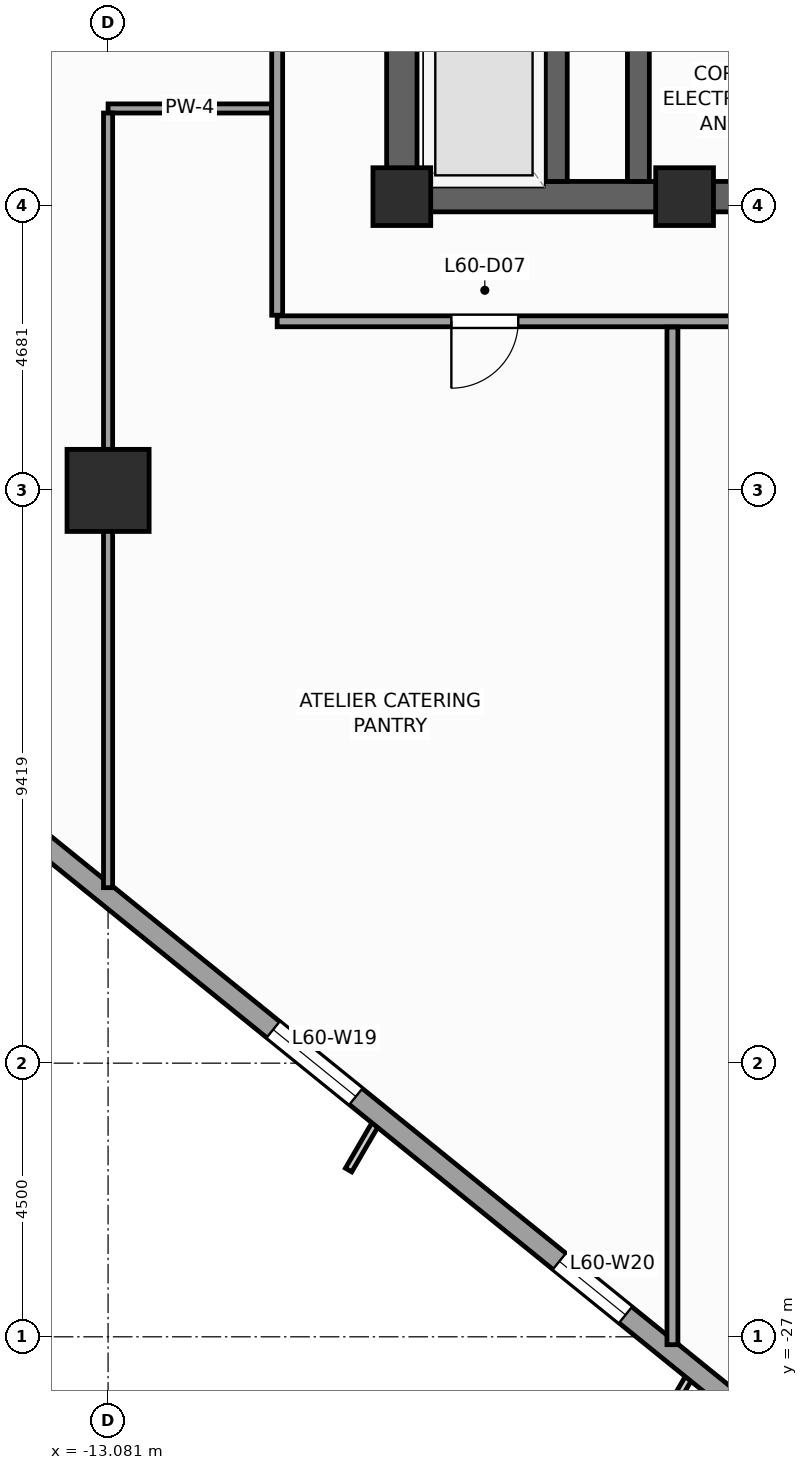
"""IFC4 building model, lengths in metres.
Left out: names, types, materials, properties, quantities, classifications, styles, units other than length and angle.
Written with IfcOpenShell. Run it as: python <this file> out.ifc"""

import sys

from ifc_helpers import new_model, si_unit, direction, frame, frame_2d, origin, origin_2d, place, context, subcontext, project, spatial, rectangle, extrude, source, transform, mapped, element, fill, save


model = new_model("IFC4")
c1 = context("Model", 3, precision=1e-05, world=origin(), true_north=direction((0.0, 1.0)))
c2 = subcontext(c1, "Body", "Model", "MODEL_VIEW")
j1 = project(units=[si_unit("LENGTHUNIT", "METRE"), si_unit("PLANEANGLEUNIT", "RADIAN")], contexts=[c1])
p1 = place(None, origin())
s1 = spatial("IfcSite", under=j1, at=p1, CompositionType="ELEMENT")
p2 = place(p1, origin())
s2 = spatial("IfcBuilding", under=s1, at=p2, CompositionType="ELEMENT")
p3 = place(p2, frame((0.0, 0.0, 248.5)))
s3 = spatial("IfcBuildingStorey", under=s2, at=p3, CompositionType="ELEMENT", Elevation=248.5)
p4 = place(p3, frame((-8.5, -8.25, 0.0), z_axis=(0.0, 0.0, 1.0), x_axis=(1.0, 0.0, 0.0)))
e1 = element("IfcWall", 1, at=p4, inside=s3, PredefinedType="SHEAR", context=c2, shape_type="SweptSolid", body=[
    extrude(rectangle(XDim=17.0, YDim=0.5, at=frame_2d((8.5, 0.0))), origin(), (0.0, 0.0, 1.0), 3.9),
])
p5 = place(p4, frame((7.85, 0.0, 0.0)))
e2 = element("IfcOpeningElement", 2, at=p5, cuts=e1, PredefinedType="OPENING", context=c2, shape_type="SweptSolid", body=[
    extrude(rectangle(XDim=1.3, YDim=2.2, at=frame_2d((0.65, 1.1))), frame((0.0, 0.26, 0.0), z_axis=(0.0, -1.0, 0.0), x_axis=(1.0, 0.0, 0.0)), (0.0, 0.0, 1.0), 0.52),
])
p6 = place(p3, frame((-8.25, -8.0, 0.0), z_axis=(0.0, 0.0, 1.0), x_axis=(0.0, 1.0, 0.0)))
e3 = element("IfcWall", 3, at=p6, inside=s3, PredefinedType="SHEAR", context=c2, shape_type="SweptSolid", body=[
    extrude(rectangle(XDim=16.0, YDim=0.5, at=frame_2d((8.0, 0.0))), origin(), (0.0, 0.0, 1.0), 3.9),
])
p7 = place(p6, frame((4.69, 0.0, 0.0)))
e4 = element("IfcOpeningElement", 4, at=p7, cuts=e3, PredefinedType="OPENING", context=c2, shape_type="SweptSolid", body=[
    extrude(rectangle(XDim=1.3, YDim=2.2, at=frame_2d((0.65, 1.1))), frame((0.0, 0.26, 0.0), z_axis=(0.0, -1.0, 0.0), x_axis=(1.0, 0.0, 0.0)), (0.0, 0.0, 1.0), 0.52),
])
p8 = place(p3, frame((-4.36, -8.0, 0.0), z_axis=(0.0, 0.0, 1.0), x_axis=(0.0, 1.0, 0.0)))
e5 = element("IfcWall", 5, at=p8, inside=s3, PredefinedType="SHEAR", context=c2, shape_type="SweptSolid", body=[
    extrude(rectangle(XDim=16.0, YDim=0.36, at=frame_2d((8.0, 0.0))), origin(), (0.0, 0.0, 1.0), 3.9),
])
p9 = place(p3, frame((-5.71, -8.0, 0.0), z_axis=(0.0, 0.0, 1.0), x_axis=(0.0, 1.0, 0.0)))
e6 = element("IfcWall", 6, at=p9, inside=s3, PredefinedType="SHEAR", context=c2, shape_type="SweptSolid", body=[
    extrude(rectangle(XDim=2.54, YDim=0.36, at=frame_2d((1.27, 0.0))), origin(), (0.0, 0.0, 1.0), 3.9),
])
m1 = source(origin(), c2, "Body", "SweptSolid", [
    extrude(rectangle(XDim=0.95, YDim=0.95, at=origin_2d()), origin(), (0.0, 0.0, 1.0), 3.9),
])
for number, where, z_axis, x_axis in (
    (7, (-8.25, -8.25, 0.0), (0.0, 0.0, 1.0), (1.0, 0.0, 0.0)),
    (8, (-3.6, -8.25, 0.0), (0.0, 0.0, 1.0), (1.0, 0.0, 0.0)),
):
    element("IfcColumn", number, at=place(p3, frame(where, z_axis=z_axis, x_axis=x_axis)), inside=s3, PredefinedType="PILASTER", context=c2, shape_type="MappedRepresentation", body=[
        mapped(m1, transform((0.0, 0.0, 0.0), scale=1.0)),
    ])
m2 = source(origin(), c2, "Body", "SweptSolid", [
    extrude(rectangle(XDim=1.35, YDim=1.35, at=origin_2d()), origin(), (0.0, 0.0, 1.0), 3.9),
])
p10 = place(p3, frame((-13.081, -13.081, 0.0), z_axis=(0.0, 0.0, 1.0), x_axis=(1.0, 0.0, 0.0)))
e9 = element("IfcColumn", 9, at=p10, inside=s3, PredefinedType="COLUMN", context=c2, shape_type="MappedRepresentation", body=[
    mapped(m2, transform((0.0, 0.0, 0.0), scale=1.0)),
])
p11 = place(p3, frame((-29.154, -6.733, 0.0), z_axis=(0.0, 0.0, 1.0), x_axis=(0.77714192302, -0.629325378072, 0.0)))
e10 = element("IfcWall", 10, at=p11, inside=s3, PredefinedType="STANDARD", context=c2, shape_type="SweptSolid", body=[
    extrude(rectangle(XDim=36.84, YDim=0.34, at=frame_2d((18.42, 0.0))), origin(), (0.0, 0.0, 1.0), 2.96),
])
p12 = place(p11, frame((3.721, 0.0, 0.48)))
e11 = element("IfcOpeningElement", 11, at=p12, cuts=e10, PredefinedType="OPENING", context=c2, shape_type="SweptSolid", body=[
    extrude(rectangle(XDim=1.4, YDim=2.4, at=frame_2d((0.7, 1.2))), frame((0.0, 0.18, 0.0), z_axis=(0.0, -1.0, 0.0), x_axis=(1.0, 0.0, 0.0)), (0.0, 0.0, 1.0), 0.36),
])
p13 = place(p11, frame((9.809, 0.0, 0.58)))
e12 = element("IfcOpeningElement", 12, at=p13, cuts=e10, PredefinedType="OPENING", context=c2, shape_type="SweptSolid", body=[
    extrude(rectangle(XDim=1.75, YDim=2.3, at=frame_2d((0.875, 1.15))), frame((0.0, 0.18, 0.0), z_axis=(0.0, -1.0, 0.0), x_axis=(1.0, 0.0, 0.0)), (0.0, 0.0, 1.0), 0.36),
])
p14 = place(p11, frame((16.058, 0.0, 0.58)))
e13 = element("IfcOpeningElement", 13, at=p14, cuts=e10, PredefinedType="OPENING", context=c2, shape_type="SweptSolid", body=[
    extrude(rectangle(XDim=1.75, YDim=2.3, at=frame_2d((0.875, 1.15))), frame((0.0, 0.18, 0.0), z_axis=(0.0, -1.0, 0.0), x_axis=(1.0, 0.0, 0.0)), (0.0, 0.0, 1.0), 0.36),
])
p15 = place(p11, frame((24.176, 0.0, 0.58)))
e14 = element("IfcOpeningElement", 14, at=p15, cuts=e10, PredefinedType="OPENING", context=c2, shape_type="SweptSolid", body=[
    extrude(rectangle(XDim=1.75, YDim=2.3, at=frame_2d((0.875, 1.15))), frame((0.0, 0.18, 0.0), z_axis=(0.0, -1.0, 0.0), x_axis=(1.0, 0.0, 0.0)), (0.0, 0.0, 1.0), 0.36),
])
p16 = place(p11, frame((30.232, 0.0, 0.48)))
e15 = element("IfcOpeningElement", 15, at=p16, cuts=e10, PredefinedType="OPENING", context=c2, shape_type="SweptSolid", body=[
    extrude(rectangle(XDim=1.4, YDim=2.4, at=frame_2d((0.7, 1.2))), frame((0.0, 0.18, 0.0), z_axis=(0.0, -1.0, 0.0), x_axis=(1.0, 0.0, 0.0)), (0.0, 0.0, 1.0), 0.36),
])
p17 = place(p3, frame((-10.3, -10.3, 0.0), z_axis=(0.0, 0.0, 1.0), x_axis=(1.0, 0.0, 0.0)))
e16 = element("IfcWall", 16, at=p17, inside=s3, PredefinedType="PARTITIONING", context=c2, shape_type="SweptSolid", body=[
    extrude(rectangle(XDim=22.75, YDim=0.18, at=frame_2d((11.375, 0.0))), origin(), (0.0, 0.0, 1.0), 3.66),
])
p18 = place(p17, frame((9.75, 0.0, 0.0)))
e17 = element("IfcOpeningElement", 17, at=p18, cuts=e16, PredefinedType="OPENING", context=c2, shape_type="SweptSolid", body=[
    extrude(rectangle(XDim=1.1, YDim=2.2, at=frame_2d((0.55, 1.1))), frame((0.0, 0.1, 0.0), z_axis=(0.0, -1.0, 0.0), x_axis=(1.0, 0.0, 0.0)), (0.0, 0.0, 1.0), 0.2),
])
p19 = place(p17, frame((2.865, 0.0, 0.0)))
e18 = element("IfcOpeningElement", 18, at=p19, cuts=e16, PredefinedType="OPENING", context=c2, shape_type="SweptSolid", body=[
    extrude(rectangle(XDim=1.1, YDim=2.2, at=frame_2d((0.55, 1.1))), frame((0.0, 0.1, 0.0), z_axis=(0.0, -1.0, 0.0), x_axis=(1.0, 0.0, 0.0)), (0.0, 0.0, 1.0), 0.2),
])
p20 = place(p3, frame((-10.3, -10.2, 0.0), z_axis=(0.0, 0.0, 1.0), x_axis=(0.0, 1.0, 0.0)))
e19 = element("IfcWall", 19, at=p20, inside=s3, PredefinedType="PARTITIONING", context=c2, shape_type="SweptSolid", body=[
    extrude(rectangle(XDim=21.5, YDim=0.18, at=frame_2d((10.75, 0.0))), origin(), (0.0, 0.0, 1.0), 3.66),
])
p21 = place(p20, frame((15.135, 0.0, 0.0)))
e20 = element("IfcOpeningElement", 20, at=p21, cuts=e19, PredefinedType="OPENING", context=c2, shape_type="SweptSolid", body=[
    extrude(rectangle(XDim=1.1, YDim=2.2, at=frame_2d((0.55, 1.1))), frame((0.0, 0.1, 0.0), z_axis=(0.0, -1.0, 0.0), x_axis=(1.0, 0.0, 0.0)), (0.0, 0.0, 1.0), 0.2),
])
p22 = place(p20, frame((6.25, 0.0, 0.0)))
e21 = element("IfcOpeningElement", 21, at=p22, cuts=e19, PredefinedType="OPENING", context=c2, shape_type="SweptSolid", body=[
    extrude(rectangle(XDim=1.1, YDim=2.2, at=frame_2d((0.55, 1.1))), frame((0.0, 0.1, 0.0), z_axis=(0.0, -1.0, 0.0), x_axis=(1.0, 0.0, 0.0)), (0.0, 0.0, 1.0), 0.2),
])
p23 = place(p3, frame((-3.8, -10.395, 0.0), z_axis=(0.0, 0.0, 1.0), x_axis=(0.0, -1.0, 0.0)))
e22 = element("IfcWall", 22, at=p23, inside=s3, PredefinedType="PARTITIONING", context=c2, shape_type="SweptSolid", body=[
    extrude(rectangle(XDim=16.734, YDim=0.18, at=frame_2d((8.367, 0.0))), origin(), (0.0, 0.0, 1.0), 3.66),
])
p24 = place(p3, frame((-10.395, -6.8, 0.0), z_axis=(0.0, 0.0, 1.0), x_axis=(-1.0, 0.0, 0.0)))
e23 = element("IfcWall", 23, at=p24, inside=s3, PredefinedType="PARTITIONING", context=c2, shape_type="SweptSolid", body=[
    extrude(rectangle(XDim=2.686, YDim=0.15, at=frame_2d((1.343, 0.0))), origin(), (0.0, 0.0, 1.0), 3.66),
])
p25 = place(p3, frame((-13.081, -6.875, 0.0), z_axis=(0.0, 0.0, 1.0), x_axis=(0.0, -1.0, 0.0)))
e24 = element("IfcWall", 24, at=p25, inside=s3, PredefinedType="PARTITIONING", context=c2, shape_type="SweptSolid", body=[
    extrude(rectangle(XDim=12.739, YDim=0.15, at=frame_2d((6.37, 0.0))), origin(), (0.0, 0.0, 1.0), 2.76),
])
m3 = source(origin(), c2, "Body", "SweptSolid", [
    extrude(rectangle(XDim=1.75, YDim=2.3, at=frame_2d((0.875, 1.15))), frame((0.0, 0.03, 0.0), z_axis=(0.0, -1.0, 0.0), x_axis=(1.0, 0.0, 0.0)), (0.0, 0.0, 1.0), 0.06),
])
p26 = place(p15, origin())
e25 = element("IfcWindow", 25, at=p26, inside=s3, PartitioningType="SINGLE_PANEL", PredefinedType="WINDOW", context=c2, shape_type="MappedRepresentation", body=[
    mapped(m3, transform((0.0, 0.0, 0.0), scale=1.0)),
])
fill(e14, e25)
m4 = source(origin(), c2, "Body", "SweptSolid", [
    extrude(rectangle(XDim=1.4, YDim=2.4, at=frame_2d((0.7, 1.2))), frame((0.0, 0.03, 0.0), z_axis=(0.0, -1.0, 0.0), x_axis=(1.0, 0.0, 0.0)), (0.0, 0.0, 1.0), 0.06),
])
p27 = place(p16, origin())
e26 = element("IfcWindow", 26, at=p27, inside=s3, PartitioningType="SINGLE_PANEL", PredefinedType="WINDOW", context=c2, shape_type="MappedRepresentation", body=[
    mapped(m4, transform((0.0, 0.0, 0.0), scale=1.0)),
])
fill(e15, e26)
m5 = source(origin(), c2, "Body", "SweptSolid", [
    extrude(rectangle(XDim=1.1, YDim=2.2, at=frame_2d((0.55, 1.1))), frame((0.0, 0.025, 0.0), z_axis=(0.0, -1.0, 0.0), x_axis=(1.0, 0.0, 0.0)), (0.0, 0.0, 1.0), 0.05),
])
p28 = place(p19, frame((1.1, 0.0, 0.0), z_axis=(0.0, 0.0, 1.0), x_axis=(-1.0, 0.0, 0.0)))
e27 = element("IfcDoor", 27, at=p28, inside=s3, OperationType="SINGLE_SWING_LEFT", PredefinedType="DOOR", context=c2, shape_type="MappedRepresentation", body=[
    mapped(m5, transform((0.0, 0.0, 0.0), scale=1.0)),
])
fill(e18, e27)
save(model, sys.argv[1])
